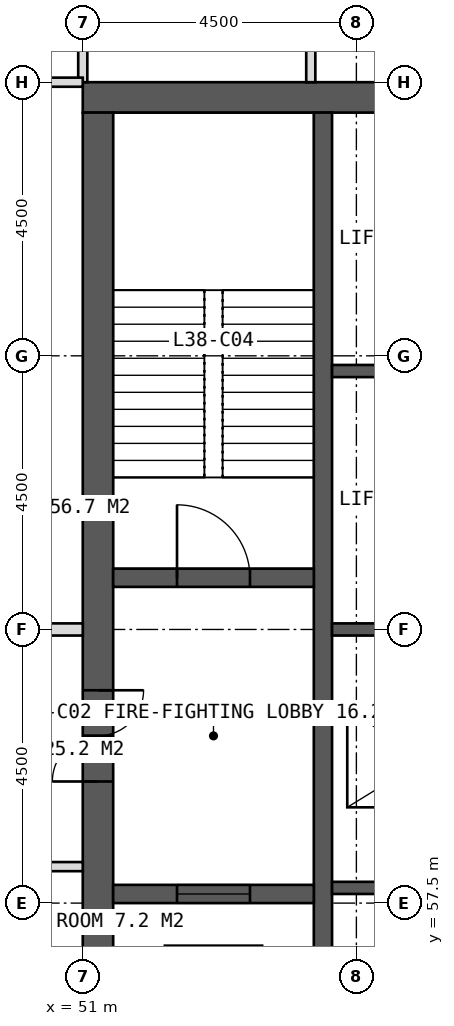
"""IFC4 building model, lengths in metres.
Left out: names, types, materials, properties, quantities, classifications, styles, units other than length and angle.
Written with IfcOpenShell. Run it as: python <this file> out.ifc"""

import sys

from ifc_helpers import new_model, si_unit, direction, frame, frame_2d, origin, place, context, subcontext, project, spatial, rectangle, extrude, element, fill, save


model = new_model("IFC4")
c1 = context("Model", 3, precision=1e-05, world=origin(), true_north=direction((0.0, 1.0)))
c2 = subcontext(c1, "Body", "Model", "MODEL_VIEW")
j1 = project(units=[si_unit("LENGTHUNIT", "METRE"), si_unit("PLANEANGLEUNIT", "RADIAN")], contexts=[c1])
p1 = place(None, origin())
s1 = spatial("IfcSite", under=j1, at=p1, CompositionType="ELEMENT")
p2 = place(p1, origin())
s2 = spatial("IfcBuilding", under=s1, at=p2, CompositionType="ELEMENT")
p3 = place(p2, frame((0.0, 0.0, 160.0)))
s3 = spatial("IfcBuildingStorey", under=s2, at=p3, CompositionType="ELEMENT", Elevation=160.0)
p4 = place(p3, frame((51.0, 70.75, 0.0), z_axis=(0.0, 0.0, 1.0), x_axis=(1.0, 0.0, 0.0)))
e1 = element("IfcWall", 1, at=p4, inside=s3, PredefinedType="SHEAR", context=c2, shape_type="SweptSolid", body=[
    extrude(rectangle(XDim=18.0, YDim=0.5, at=frame_2d((9.0, 0.0))), origin(), (0.0, 0.0, 1.0), 4.0),
])
p5 = place(p4, frame((8.1, 0.0, 0.0)))
e2 = element("IfcOpeningElement", 2, at=p5, cuts=e1, PredefinedType="OPENING", context=c2, shape_type="SweptSolid", body=[
    extrude(rectangle(XDim=1.8, YDim=2.2, at=frame_2d((0.9, 1.1))), frame((0.0, 0.26, 0.0), z_axis=(0.0, -1.0, 0.0), x_axis=(1.0, 0.0, 0.0)), (0.0, 0.0, 1.0), 0.52),
])
p6 = place(p3, frame((51.25, 53.5, 0.0), z_axis=(0.0, 0.0, 1.0), x_axis=(0.0, 1.0, 0.0)))
e3 = element("IfcWall", 3, at=p6, inside=s3, PredefinedType="SHEAR", context=c2, shape_type="SweptSolid", body=[
    extrude(rectangle(XDim=17.0, YDim=0.5, at=frame_2d((8.5, 0.0))), origin(), (0.0, 0.0, 1.0), 4.0),
])
p7 = place(p6, frame((6.0, 0.0, 0.0)))
e4 = element("IfcOpeningElement", 4, at=p7, cuts=e3, PredefinedType="OPENING", context=c2, shape_type="SweptSolid", body=[
    extrude(rectangle(XDim=1.5, YDim=2.2, at=frame_2d((0.75, 1.1))), frame((0.0, 0.26, 0.0), z_axis=(0.0, -1.0, 0.0), x_axis=(1.0, 0.0, 0.0)), (0.0, 0.0, 1.0), 0.52),
])
p8 = place(p3, frame((54.95, 53.5, 0.0), z_axis=(0.0, 0.0, 1.0), x_axis=(0.0, 1.0, 0.0)))
e5 = element("IfcWall", 5, at=p8, inside=s3, PredefinedType="SHEAR", context=c2, shape_type="SweptSolid", body=[
    extrude(rectangle(XDim=17.0, YDim=0.3, at=frame_2d((8.5, 0.0))), origin(), (0.0, 0.0, 1.0), 4.0),
])
for number, where, z_axis, x_axis in (
    (6, (55.1, 57.75, 0.0), (0.0, 0.0, 1.0), (1.0, 0.0, 0.0)),
    (7, (55.1, 62.0, 0.0), (0.0, 0.0, 1.0), (1.0, 0.0, 0.0)),
    (8, (55.1, 66.25, 0.0), (0.0, 0.0, 1.0), (1.0, 0.0, 0.0)),
):
    element("IfcWall", number, at=place(p3, frame(where, z_axis=z_axis, x_axis=x_axis)), inside=s3, PredefinedType="SHEAR", context=c2, shape_type="SweptSolid", body=[
        extrude(rectangle(XDim=3.05, YDim=0.2, at=frame_2d((1.525, 0.0))), origin(), (0.0, 0.0, 1.0), 4.0),
    ])
p9 = place(p3, frame((51.5, 62.85, 0.0), z_axis=(0.0, 0.0, 1.0), x_axis=(1.0, 0.0, 0.0)))
e9 = element("IfcWall", 9, at=p9, inside=s3, PredefinedType="SHEAR", context=c2, shape_type="SweptSolid", body=[
    extrude(rectangle(XDim=3.3, YDim=0.3, at=frame_2d((1.65, 0.0))), origin(), (0.0, 0.0, 1.0), 4.0),
])
p10 = place(p9, frame((1.05, 0.0, 0.0)))
e10 = element("IfcOpeningElement", 10, at=p10, cuts=e9, PredefinedType="OPENING", context=c2, shape_type="SweptSolid", body=[
    extrude(rectangle(XDim=1.2, YDim=2.1, at=frame_2d((0.6, 1.05))), frame((0.0, 0.16, 0.0), z_axis=(0.0, -1.0, 0.0), x_axis=(1.0, 0.0, 0.0)), (0.0, 0.0, 1.0), 0.32),
])
p11 = place(p3, frame((51.5, 57.65, 0.0), z_axis=(0.0, 0.0, 1.0), x_axis=(1.0, 0.0, 0.0)))
e11 = element("IfcWall", 11, at=p11, inside=s3, PredefinedType="SHEAR", context=c2, shape_type="SweptSolid", body=[
    extrude(rectangle(XDim=3.3, YDim=0.3, at=frame_2d((1.65, 0.0))), origin(), (0.0, 0.0, 1.0), 4.0),
])
p12 = place(p11, frame((1.05, 0.0, 0.0)))
e12 = element("IfcOpeningElement", 12, at=p12, cuts=e11, PredefinedType="OPENING", context=c2, shape_type="SweptSolid", body=[
    extrude(rectangle(XDim=1.2, YDim=2.2, at=frame_2d((0.6, 1.1))), frame((0.0, 0.16, 0.0), z_axis=(0.0, -1.0, 0.0), x_axis=(1.0, 0.0, 0.0)), (0.0, 0.0, 1.0), 0.32),
])
p13 = place(p3, frame((51.0, 71.0, 0.0), z_axis=(0.0, 0.0, 1.0), x_axis=(0.0, 1.0, 0.0)))
e13 = element("IfcWall", 13, at=p13, inside=s3, PredefinedType="PARTITIONING", context=c2, shape_type="SweptSolid", body=[
    extrude(rectangle(XDim=6.3, YDim=0.15, at=frame_2d((3.15, 0.0))), origin(), (0.0, 0.0, 1.0), 3.75),
])
p14 = place(p3, frame((54.75, 71.0, 0.0), z_axis=(0.0, 0.0, 1.0), x_axis=(0.0, 1.0, 0.0)))
e14 = element("IfcWall", 14, at=p14, inside=s3, PredefinedType="PARTITIONING", context=c2, shape_type="SweptSolid", body=[
    extrude(rectangle(XDim=2.4, YDim=0.15, at=frame_2d((1.2, 0.0))), origin(), (0.0, 0.0, 1.0), 3.75),
])
p15 = place(p3, frame((51.0, 58.1, 0.0), z_axis=(0.0, 0.0, 1.0), x_axis=(-1.0, 0.0, 0.0)))
e15 = element("IfcWall", 15, at=p15, inside=s3, PredefinedType="PARTITIONING", context=c2, shape_type="SweptSolid", body=[
    extrude(rectangle(XDim=6.3, YDim=0.15, at=frame_2d((3.15, 0.0))), origin(), (0.0, 0.0, 1.0), 3.75),
])
p16 = place(p15, frame((0.6, 0.0, 0.0)))
e16 = element("IfcOpeningElement", 16, at=p16, cuts=e15, PredefinedType="OPENING", context=c2, shape_type="SweptSolid", body=[
    extrude(rectangle(XDim=0.9, YDim=2.1, at=frame_2d((0.45, 1.05))), frame((0.0, 0.085, 0.0), z_axis=(0.0, -1.0, 0.0), x_axis=(1.0, 0.0, 0.0)), (0.0, 0.0, 1.0), 0.17),
])
p17 = place(p3, frame((51.0, 62.0, 0.0), z_axis=(0.0, 0.0, 1.0), x_axis=(-1.0, 0.0, 0.0)))
e17 = element("IfcWall", 17, at=p17, inside=s3, PredefinedType="SOLIDWALL", context=c2, shape_type="SweptSolid", body=[
    extrude(rectangle(XDim=6.3, YDim=0.2, at=frame_2d((3.15, 0.0))), origin(), (0.0, 0.0, 1.0), 2.95),
])
p18 = place(p3, frame((51.0, 71.0, 0.0), z_axis=(0.0, 0.0, 1.0), x_axis=(-1.0, 0.0, 0.0)))
e18 = element("IfcWall", 18, at=p18, inside=s3, PredefinedType="PARTITIONING", context=c2, shape_type="SweptSolid", body=[
    extrude(rectangle(XDim=6.3, YDim=0.15, at=frame_2d((3.15, 0.0))), origin(), (0.0, 0.0, 1.0), 3.75),
])
p19 = place(p7, origin())
e19 = element("IfcDoor", 19, at=p19, inside=s3, OperationType="DOUBLE_DOOR_SINGLE_SWING", PredefinedType="DOOR", context=c2, shape_type="SweptSolid", body=[
    extrude(rectangle(XDim=1.5, YDim=2.2, at=frame_2d((0.75, 1.1))), frame((0.0, 0.025, 0.0), z_axis=(0.0, -1.0, 0.0), x_axis=(1.0, 0.0, 0.0)), (0.0, 0.0, 1.0), 0.05),
])
fill(e4, e19)
p20 = place(p10, origin())
e20 = element("IfcDoor", 20, at=p20, inside=s3, OperationType="SINGLE_SWING_LEFT", PredefinedType="DOOR", context=c2, shape_type="SweptSolid", body=[
    extrude(rectangle(XDim=1.2, YDim=2.1, at=frame_2d((0.6, 1.05))), frame((0.0, 0.025, 0.0), z_axis=(0.0, -1.0, 0.0), x_axis=(1.0, 0.0, 0.0)), (0.0, 0.0, 1.0), 0.05),
])
fill(e10, e20)
p21 = place(p12, origin())
e21 = element("IfcDoor", 21, at=p21, inside=s3, OperationType="SLIDING_TO_LEFT", PredefinedType="DOOR", context=c2, shape_type="SweptSolid", body=[
    extrude(rectangle(XDim=1.2, YDim=2.2, at=frame_2d((0.6, 1.1))), frame((0.0, 0.025, 0.0), z_axis=(0.0, -1.0, 0.0), x_axis=(1.0, 0.0, 0.0)), (0.0, 0.0, 1.0), 0.05),
])
fill(e12, e21)
save(model, sys.argv[1])
